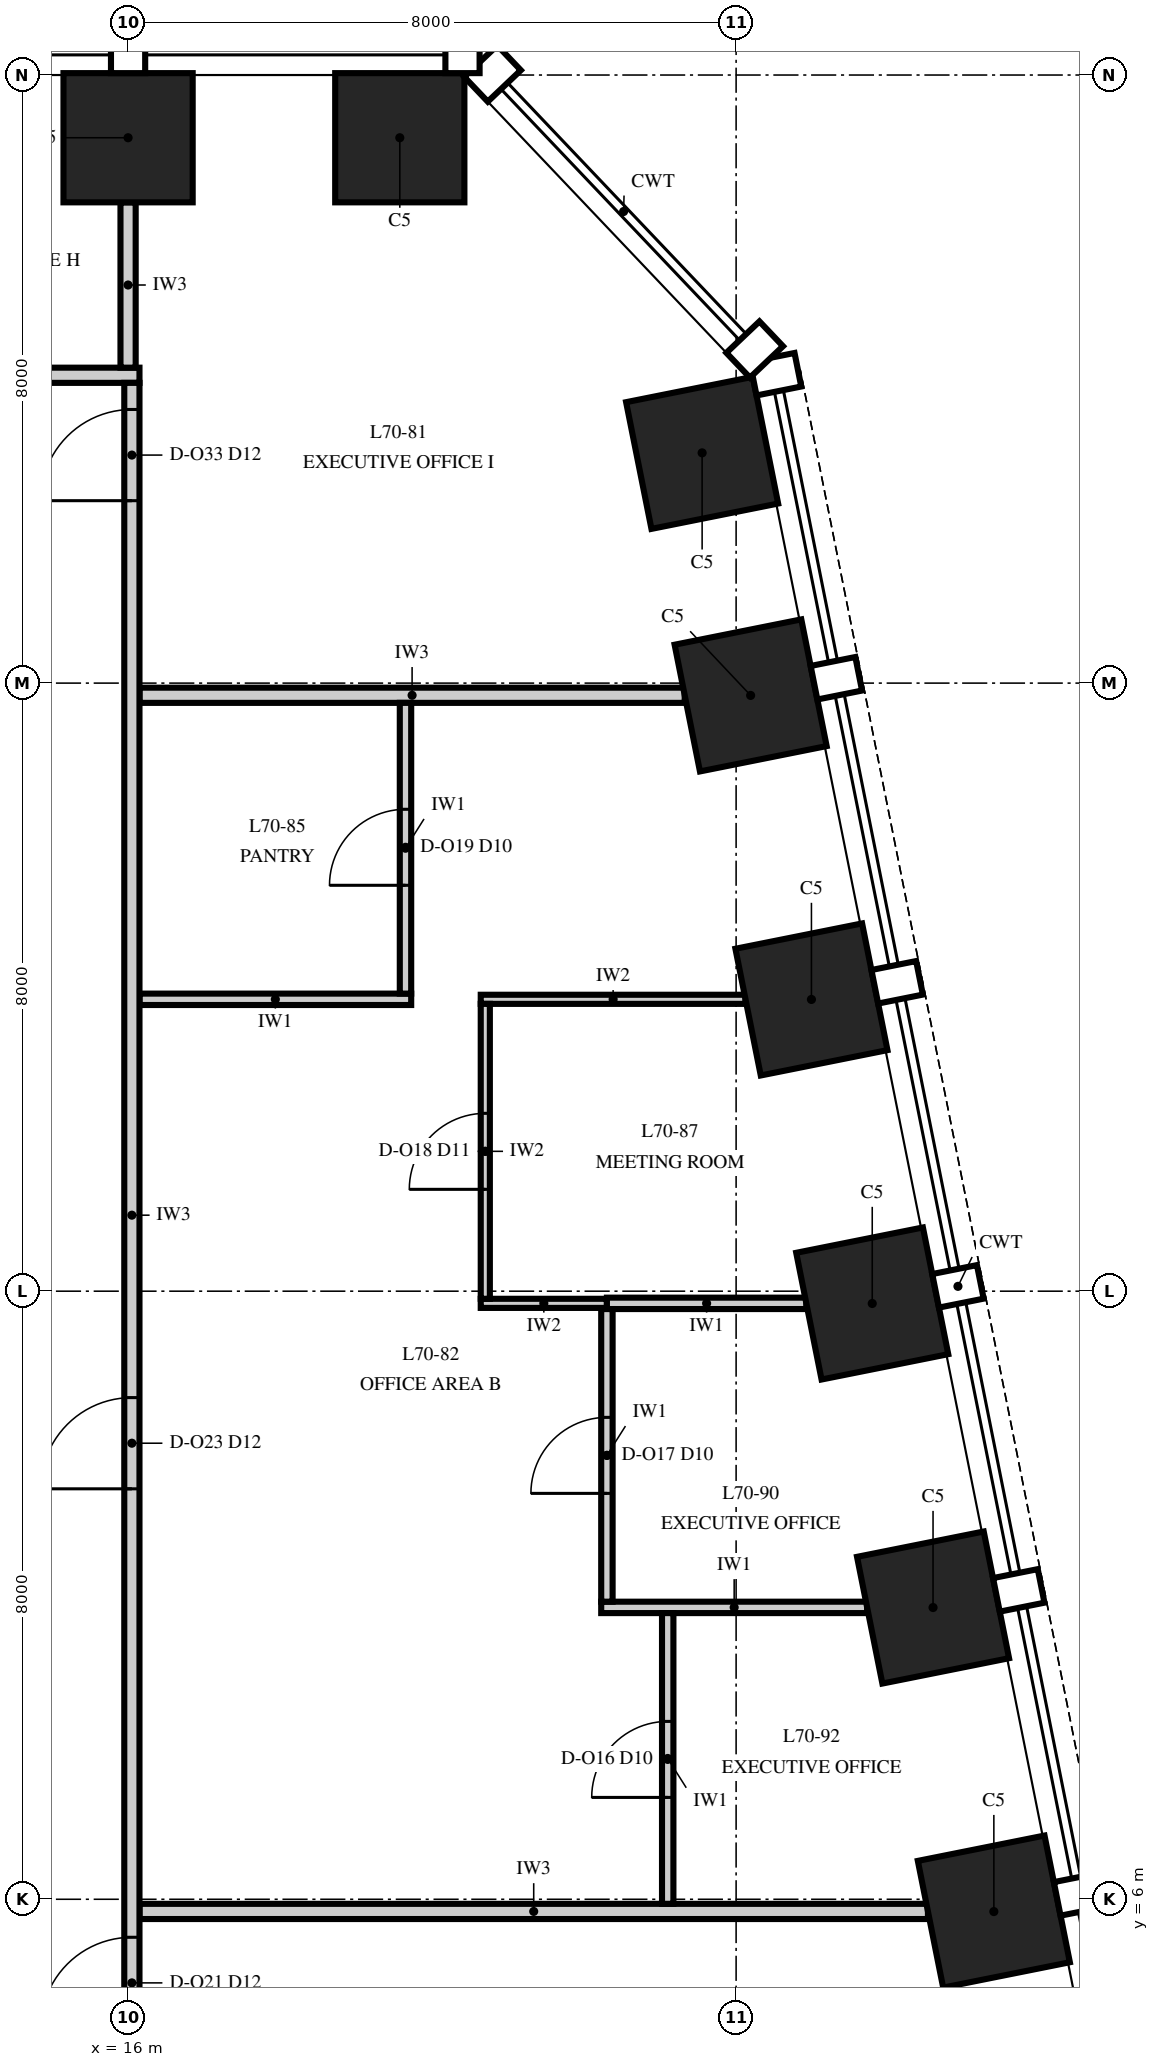
"""IFC4 building model, lengths in metres.
Left out: names, types, materials, properties, quantities, classifications, styles, units other than length and angle.
Written with IfcOpenShell. Run it as: python <this file> out.ifc"""

import sys

from ifc_helpers import new_model, si_unit, direction, frame, frame_2d, origin, origin_2d, place, context, subcontext, project, spatial, rectangle, extrude, element, fill, save


model = new_model("IFC4")
c1 = context("Model", 3, precision=1e-05, world=origin(), true_north=direction((0.0, 1.0)))
c2 = subcontext(c1, "Body", "Model", "MODEL_VIEW")
j1 = project(units=[si_unit("LENGTHUNIT", "METRE"), si_unit("PLANEANGLEUNIT", "RADIAN")], contexts=[c1])
p1 = place(None, origin())
s1 = spatial("IfcSite", under=j1, at=p1, CompositionType="ELEMENT")
p2 = place(p1, origin())
s2 = spatial("IfcBuilding", under=s1, at=p2, CompositionType="ELEMENT")
p3 = place(p2, frame((0.0, 0.0, 300.0)))
s3 = spatial("IfcBuildingStorey", under=s2, at=p3, CompositionType="ELEMENT", Elevation=300.0)
for number, where, z_axis, x_axis in (
    (1, (27.391, 5.838, 0.0), (0.0, 0.0, 1.0), (-0.196, 0.981, 0.0)),
    (2, (26.591, 9.838, 0.0), (0.0, 0.0, 1.0), (-0.196, 0.981, 0.0)),
    (3, (25.791, 13.838, 0.0), (0.0, 0.0, 1.0), (-0.196, 0.981, 0.0)),
    (4, (24.991, 17.838, 0.0), (0.0, 0.0, 1.0), (-0.196, 0.981, 0.0)),
    (5, (24.191, 21.838, 0.0), (0.0, 0.0, 1.0), (-0.196, 0.981, 0.0)),
    (6, (23.553, 25.029, 0.0), (0.0, 0.0, 1.0), (-0.196, 0.981, 0.0)),
    (7, (19.575, 29.175, 0.0), (0.0, 0.0, 1.0), (-1.0, 0.0, 0.0)),
    (8, (16.0, 29.175, 0.0), (0.0, 0.0, 1.0), (-1.0, 0.0, 0.0)),
):
    element("IfcColumn", number, at=place(p3, frame(where, z_axis=z_axis, x_axis=x_axis)), inside=s3, PredefinedType="COLUMN", context=c2, shape_type="SweptSolid", body=[
        extrude(rectangle(XDim=1.7, YDim=1.7, at=origin_2d()), origin(), (0.0, 0.0, 1.0), 4.0),
    ])
p4 = place(p3, frame((16.15, 5.84, 0.0), z_axis=(0.0, 0.0, 1.0), x_axis=(1.0, 0.0, 0.0)))
e9 = element("IfcWall", 9, at=p4, inside=s3, PredefinedType="PARTITIONING", context=c2, shape_type="SweptSolid", body=[
    extrude(rectangle(XDim=10.374, YDim=0.2, at=frame_2d((5.187, 0.0))), origin(), (0.0, 0.0, 1.0), 2.842),
])
p5 = place(p3, frame((22.225, 9.84, 0.0), z_axis=(0.0, 0.0, 1.0), x_axis=(1.0, 0.0, 0.0)))
e10 = element("IfcWall", 10, at=p5, inside=s3, PredefinedType="PARTITIONING", context=c2, shape_type="SweptSolid", body=[
    extrude(rectangle(XDim=3.499, YDim=0.15, at=frame_2d((1.75, 0.0))), origin(), (0.0, 0.0, 1.0), 3.23),
])
p6 = place(p3, frame((20.64, 13.84, 0.0), z_axis=(0.0, 0.0, 1.0), x_axis=(1.0, 0.0, 0.0)))
e11 = element("IfcWall", 11, at=p6, inside=s3, PredefinedType="PARTITIONING", context=c2, shape_type="SweptSolid", body=[
    extrude(rectangle(XDim=1.66, YDim=0.12, at=frame_2d((0.83, 0.0))), origin(), (0.0, 0.0, 1.0), 3.85),
])
p7 = place(p3, frame((22.3, 13.84, 0.0), z_axis=(0.0, 0.0, 1.0), x_axis=(1.0, 0.0, 0.0)))
e12 = element("IfcWall", 12, at=p7, inside=s3, PredefinedType="PARTITIONING", context=c2, shape_type="SweptSolid", body=[
    extrude(rectangle(XDim=2.624, YDim=0.15, at=frame_2d((1.312, 0.0))), origin(), (0.0, 0.0, 1.0), 3.23),
])
p8 = place(p3, frame((16.15, 17.84, 0.0), z_axis=(0.0, 0.0, 1.0), x_axis=(1.0, 0.0, 0.0)))
e13 = element("IfcWall", 13, at=p8, inside=s3, PredefinedType="PARTITIONING", context=c2, shape_type="SweptSolid", body=[
    extrude(rectangle(XDim=3.575, YDim=0.15, at=frame_2d((1.788, 0.0))), origin(), (0.0, 0.0, 1.0), 3.23),
])
p9 = place(p3, frame((20.64, 17.84, 0.0), z_axis=(0.0, 0.0, 1.0), x_axis=(1.0, 0.0, 0.0)))
e14 = element("IfcWall", 14, at=p9, inside=s3, PredefinedType="PARTITIONING", context=c2, shape_type="SweptSolid", body=[
    extrude(rectangle(XDim=3.484, YDim=0.12, at=frame_2d((1.742, 0.0))), origin(), (0.0, 0.0, 1.0), 3.23),
])
p10 = place(p3, frame((16.15, 21.84, 0.0), z_axis=(0.0, 0.0, 1.0), x_axis=(1.0, 0.0, 0.0)))
e15 = element("IfcWall", 15, at=p10, inside=s3, PredefinedType="PARTITIONING", context=c2, shape_type="SweptSolid", body=[
    extrude(rectangle(XDim=7.174, YDim=0.2, at=frame_2d((3.587, 0.0))), origin(), (0.0, 0.0, 1.0), 3.23),
])
p11 = place(p3, frame((-16.15, 26.05, 0.0), z_axis=(0.0, 0.0, 1.0), x_axis=(1.0, 0.0, 0.0)))
e16 = element("IfcWall", 16, at=p11, inside=s3, PredefinedType="PARTITIONING", context=c2, shape_type="SweptSolid", body=[
    extrude(rectangle(XDim=32.3, YDim=0.2, at=frame_2d((16.15, 0.0))), origin(), (0.0, 0.0, 1.0), 3.418),
])
p12 = place(p11, frame((1.55, 0.0, 0.0)))
e17 = element("IfcOpeningElement", 17, at=p12, cuts=e16, PredefinedType="OPENING", context=c2, shape_type="SweptSolid", body=[
    extrude(rectangle(XDim=1.2, YDim=2.4, at=frame_2d((0.6, 1.2))), frame((0.0, 0.115, 0.0), z_axis=(0.0, -1.0, 0.0), x_axis=(1.0, 0.0, 0.0)), (0.0, 0.0, 1.0), 0.23),
])
p13 = place(p11, frame((5.55, 0.0, 0.0)))
e18 = element("IfcOpeningElement", 18, at=p13, cuts=e16, PredefinedType="OPENING", context=c2, shape_type="SweptSolid", body=[
    extrude(rectangle(XDim=1.2, YDim=2.4, at=frame_2d((0.6, 1.2))), frame((0.0, 0.115, 0.0), z_axis=(0.0, -1.0, 0.0), x_axis=(1.0, 0.0, 0.0)), (0.0, 0.0, 1.0), 0.23),
])
p14 = place(p11, frame((9.55, 0.0, 0.0)))
e19 = element("IfcOpeningElement", 19, at=p14, cuts=e16, PredefinedType="OPENING", context=c2, shape_type="SweptSolid", body=[
    extrude(rectangle(XDim=1.2, YDim=2.4, at=frame_2d((0.6, 1.2))), frame((0.0, 0.115, 0.0), z_axis=(0.0, -1.0, 0.0), x_axis=(1.0, 0.0, 0.0)), (0.0, 0.0, 1.0), 0.23),
])
p15 = place(p11, frame((13.55, 0.0, 0.0)))
e20 = element("IfcOpeningElement", 20, at=p15, cuts=e16, PredefinedType="OPENING", context=c2, shape_type="SweptSolid", body=[
    extrude(rectangle(XDim=1.2, YDim=2.4, at=frame_2d((0.6, 1.2))), frame((0.0, 0.115, 0.0), z_axis=(0.0, -1.0, 0.0), x_axis=(1.0, 0.0, 0.0)), (0.0, 0.0, 1.0), 0.23),
])
p16 = place(p11, frame((17.55, 0.0, 0.0)))
e21 = element("IfcOpeningElement", 21, at=p16, cuts=e16, PredefinedType="OPENING", context=c2, shape_type="SweptSolid", body=[
    extrude(rectangle(XDim=1.2, YDim=2.4, at=frame_2d((0.6, 1.2))), frame((0.0, 0.115, 0.0), z_axis=(0.0, -1.0, 0.0), x_axis=(1.0, 0.0, 0.0)), (0.0, 0.0, 1.0), 0.23),
])
p17 = place(p11, frame((21.55, 0.0, 0.0)))
e22 = element("IfcOpeningElement", 22, at=p17, cuts=e16, PredefinedType="OPENING", context=c2, shape_type="SweptSolid", body=[
    extrude(rectangle(XDim=1.2, YDim=2.4, at=frame_2d((0.6, 1.2))), frame((0.0, 0.115, 0.0), z_axis=(0.0, -1.0, 0.0), x_axis=(1.0, 0.0, 0.0)), (0.0, 0.0, 1.0), 0.23),
])
p18 = place(p11, frame((25.55, 0.0, 0.0)))
e23 = element("IfcOpeningElement", 23, at=p18, cuts=e16, PredefinedType="OPENING", context=c2, shape_type="SweptSolid", body=[
    extrude(rectangle(XDim=1.2, YDim=2.4, at=frame_2d((0.6, 1.2))), frame((0.0, 0.115, 0.0), z_axis=(0.0, -1.0, 0.0), x_axis=(1.0, 0.0, 0.0)), (0.0, 0.0, 1.0), 0.23),
])
p19 = place(p11, frame((29.55, 0.0, 0.0)))
e24 = element("IfcOpeningElement", 24, at=p19, cuts=e16, PredefinedType="OPENING", context=c2, shape_type="SweptSolid", body=[
    extrude(rectangle(XDim=1.2, YDim=2.4, at=frame_2d((0.6, 1.2))), frame((0.0, 0.115, 0.0), z_axis=(0.0, -1.0, 0.0), x_axis=(1.0, 0.0, 0.0)), (0.0, 0.0, 1.0), 0.23),
])
p20 = place(p3, frame((16.0, 26.15, 0.0), z_axis=(0.0, 0.0, 1.0), x_axis=(0.0, 1.0, 0.0)))
e25 = element("IfcWall", 25, at=p20, inside=s3, PredefinedType="PARTITIONING", context=c2, shape_type="SweptSolid", body=[
    extrude(rectangle(XDim=2.175, YDim=0.2, at=frame_2d((1.087, 0.0))), origin(), (0.0, 0.0, 1.0), 3.418),
])
p21 = place(p3, frame((16.05, 4.05, 0.0), z_axis=(0.0, 0.0, 1.0), x_axis=(0.0, 1.0, 0.0)))
e26 = element("IfcWall", 26, at=p21, inside=s3, PredefinedType="PARTITIONING", context=c2, shape_type="SweptSolid", body=[
    extrude(rectangle(XDim=21.9, YDim=0.2, at=frame_2d((10.95, 0.0))), origin(), (0.0, 0.0, 1.0), 2.842),
])
p22 = place(p21, frame((0.25, 0.0, 0.0)))
e27 = element("IfcOpeningElement", 27, at=p22, cuts=e26, PredefinedType="OPENING", context=c2, shape_type="SweptSolid", body=[
    extrude(rectangle(XDim=1.2, YDim=2.4, at=frame_2d((0.6, 1.2))), frame((0.0, 0.115, 0.0), z_axis=(0.0, -1.0, 0.0), x_axis=(1.0, 0.0, 0.0)), (0.0, 0.0, 1.0), 0.23),
])
p23 = place(p21, frame((7.35, 0.0, 0.0)))
e28 = element("IfcOpeningElement", 28, at=p23, cuts=e26, PredefinedType="OPENING", context=c2, shape_type="SweptSolid", body=[
    extrude(rectangle(XDim=1.2, YDim=2.4, at=frame_2d((0.6, 1.2))), frame((0.0, 0.115, 0.0), z_axis=(0.0, -1.0, 0.0), x_axis=(1.0, 0.0, 0.0)), (0.0, 0.0, 1.0), 0.23),
])
p24 = place(p21, frame((20.35, 0.0, 0.0)))
e29 = element("IfcOpeningElement", 29, at=p24, cuts=e26, PredefinedType="OPENING", context=c2, shape_type="SweptSolid", body=[
    extrude(rectangle(XDim=1.2, YDim=2.4, at=frame_2d((0.6, 1.2))), frame((0.0, 0.115, 0.0), z_axis=(0.0, -1.0, 0.0), x_axis=(1.0, 0.0, 0.0)), (0.0, 0.0, 1.0), 0.23),
])
p25 = place(p3, frame((19.65, 17.915, 0.0), z_axis=(0.0, 0.0, 1.0), x_axis=(0.0, 1.0, 0.0)))
e30 = element("IfcWall", 30, at=p25, inside=s3, PredefinedType="PARTITIONING", context=c2, shape_type="SweptSolid", body=[
    extrude(rectangle(XDim=3.825, YDim=0.15, at=frame_2d((1.913, 0.0))), origin(), (0.0, 0.0, 1.0), 3.23),
])
p26 = place(p25, frame((1.425, 0.0, 0.0)))
e31 = element("IfcOpeningElement", 31, at=p26, cuts=e30, PredefinedType="OPENING", context=c2, shape_type="SweptSolid", body=[
    extrude(rectangle(XDim=1.0, YDim=2.3, at=frame_2d((0.5, 1.15))), frame((0.0, 0.09, 0.0), z_axis=(0.0, -1.0, 0.0), x_axis=(1.0, 0.0, 0.0)), (0.0, 0.0, 1.0), 0.18),
])
p27 = place(p3, frame((20.7, 13.9, 0.0), z_axis=(0.0, 0.0, 1.0), x_axis=(0.0, 1.0, 0.0)))
e32 = element("IfcWall", 32, at=p27, inside=s3, PredefinedType="PARTITIONING", context=c2, shape_type="SweptSolid", body=[
    extrude(rectangle(XDim=3.88, YDim=0.12, at=frame_2d((1.94, 0.0))), origin(), (0.0, 0.0, 1.0), 3.23),
])
p28 = place(p27, frame((1.44, 0.0, 0.0)))
e33 = element("IfcOpeningElement", 33, at=p28, cuts=e32, PredefinedType="OPENING", context=c2, shape_type="SweptSolid", body=[
    extrude(rectangle(XDim=1.0, YDim=2.4, at=frame_2d((0.5, 1.2))), frame((0.0, 0.075, 0.0), z_axis=(0.0, -1.0, 0.0), x_axis=(1.0, 0.0, 0.0)), (0.0, 0.0, 1.0), 0.15),
])
p29 = place(p3, frame((22.3, 9.915, 0.0), z_axis=(0.0, 0.0, 1.0), x_axis=(0.0, 1.0, 0.0)))
e34 = element("IfcWall", 34, at=p29, inside=s3, PredefinedType="PARTITIONING", context=c2, shape_type="SweptSolid", body=[
    extrude(rectangle(XDim=3.85, YDim=0.15, at=frame_2d((1.925, 0.0))), origin(), (0.0, 0.0, 1.0), 3.85),
])
p30 = place(p29, frame((1.425, 0.0, 0.0)))
e35 = element("IfcOpeningElement", 35, at=p30, cuts=e34, PredefinedType="OPENING", context=c2, shape_type="SweptSolid", body=[
    extrude(rectangle(XDim=1.0, YDim=2.3, at=frame_2d((0.5, 1.15))), frame((0.0, 0.09, 0.0), z_axis=(0.0, -1.0, 0.0), x_axis=(1.0, 0.0, 0.0)), (0.0, 0.0, 1.0), 0.18),
])
p31 = place(p3, frame((23.1, 5.94, 0.0), z_axis=(0.0, 0.0, 1.0), x_axis=(0.0, 1.0, 0.0)))
e36 = element("IfcWall", 36, at=p31, inside=s3, PredefinedType="PARTITIONING", context=c2, shape_type="SweptSolid", body=[
    extrude(rectangle(XDim=3.825, YDim=0.15, at=frame_2d((1.913, 0.0))), origin(), (0.0, 0.0, 1.0), 2.842),
])
p32 = place(p31, frame((1.4, 0.0, 0.0)))
e37 = element("IfcOpeningElement", 37, at=p32, cuts=e36, PredefinedType="OPENING", context=c2, shape_type="SweptSolid", body=[
    extrude(rectangle(XDim=1.0, YDim=2.3, at=frame_2d((0.5, 1.15))), frame((0.0, 0.09, 0.0), z_axis=(0.0, -1.0, 0.0), x_axis=(1.0, 0.0, 0.0)), (0.0, 0.0, 1.0), 0.18),
])
p33 = place(p32, origin())
e38 = element("IfcDoor", 38, at=p33, inside=s3, OperationType="SINGLE_SWING_LEFT", PredefinedType="DOOR", context=c2, shape_type="SweptSolid", body=[
    extrude(rectangle(XDim=1.0, YDim=2.3, at=frame_2d((0.5, 1.15))), frame((0.0, 0.075, 0.0), z_axis=(0.0, -1.0, 0.0), x_axis=(1.0, 0.0, 0.0)), (0.0, 0.0, 1.0), 0.149),
])
fill(e37, e38)
p34 = place(p30, origin())
e39 = element("IfcDoor", 39, at=p34, inside=s3, OperationType="SINGLE_SWING_LEFT", PredefinedType="DOOR", context=c2, shape_type="SweptSolid", body=[
    extrude(rectangle(XDim=1.0, YDim=2.3, at=frame_2d((0.5, 1.15))), frame((0.0, 0.075, 0.0), z_axis=(0.0, -1.0, 0.0), x_axis=(1.0, 0.0, 0.0)), (0.0, 0.0, 1.0), 0.149),
])
fill(e35, e39)
p35 = place(p28, origin())
e40 = element("IfcDoor", 40, at=p35, inside=s3, OperationType="SINGLE_SWING_RIGHT", PredefinedType="DOOR", context=c2, shape_type="SweptSolid", body=[
    extrude(rectangle(XDim=1.0, YDim=2.4, at=frame_2d((0.5, 1.2))), frame((0.0, 0.06, 0.0), z_axis=(0.0, -1.0, 0.0), x_axis=(1.0, 0.0, 0.0)), (0.0, 0.0, 1.0), 0.12),
])
fill(e33, e40)
p36 = place(p26, origin())
e41 = element("IfcDoor", 41, at=p36, inside=s3, OperationType="SINGLE_SWING_LEFT", PredefinedType="DOOR", context=c2, shape_type="SweptSolid", body=[
    extrude(rectangle(XDim=1.0, YDim=2.3, at=frame_2d((0.5, 1.15))), frame((0.0, 0.075, 0.0), z_axis=(0.0, -1.0, 0.0), x_axis=(1.0, 0.0, 0.0)), (0.0, 0.0, 1.0), 0.149),
])
fill(e31, e41)
p37 = place(p22, origin())
e42 = element("IfcDoor", 42, at=p37, inside=s3, OperationType="SINGLE_SWING_LEFT", PredefinedType="DOOR", context=c2, shape_type="SweptSolid", body=[
    extrude(rectangle(XDim=1.2, YDim=2.4, at=frame_2d((0.6, 1.2))), frame((0.0, 0.1, 0.0), z_axis=(0.0, -1.0, 0.0), x_axis=(1.0, 0.0, 0.0)), (0.0, 0.0, 1.0), 0.199),
])
fill(e27, e42)
p38 = place(p23, origin())
e43 = element("IfcDoor", 43, at=p38, inside=s3, OperationType="SINGLE_SWING_LEFT", PredefinedType="DOOR", context=c2, shape_type="SweptSolid", body=[
    extrude(rectangle(XDim=1.2, YDim=2.4, at=frame_2d((0.6, 1.2))), frame((0.0, 0.1, 0.0), z_axis=(0.0, -1.0, 0.0), x_axis=(1.0, 0.0, 0.0)), (0.0, 0.0, 1.0), 0.199),
])
fill(e28, e43)
p39 = place(p24, origin())
e44 = element("IfcDoor", 44, at=p39, inside=s3, OperationType="SINGLE_SWING_LEFT", PredefinedType="DOOR", context=c2, shape_type="SweptSolid", body=[
    extrude(rectangle(XDim=1.2, YDim=2.4, at=frame_2d((0.6, 1.2))), frame((0.0, 0.1, 0.0), z_axis=(0.0, -1.0, 0.0), x_axis=(1.0, 0.0, 0.0)), (0.0, 0.0, 1.0), 0.199),
])
fill(e29, e44)
save(model, sys.argv[1])
